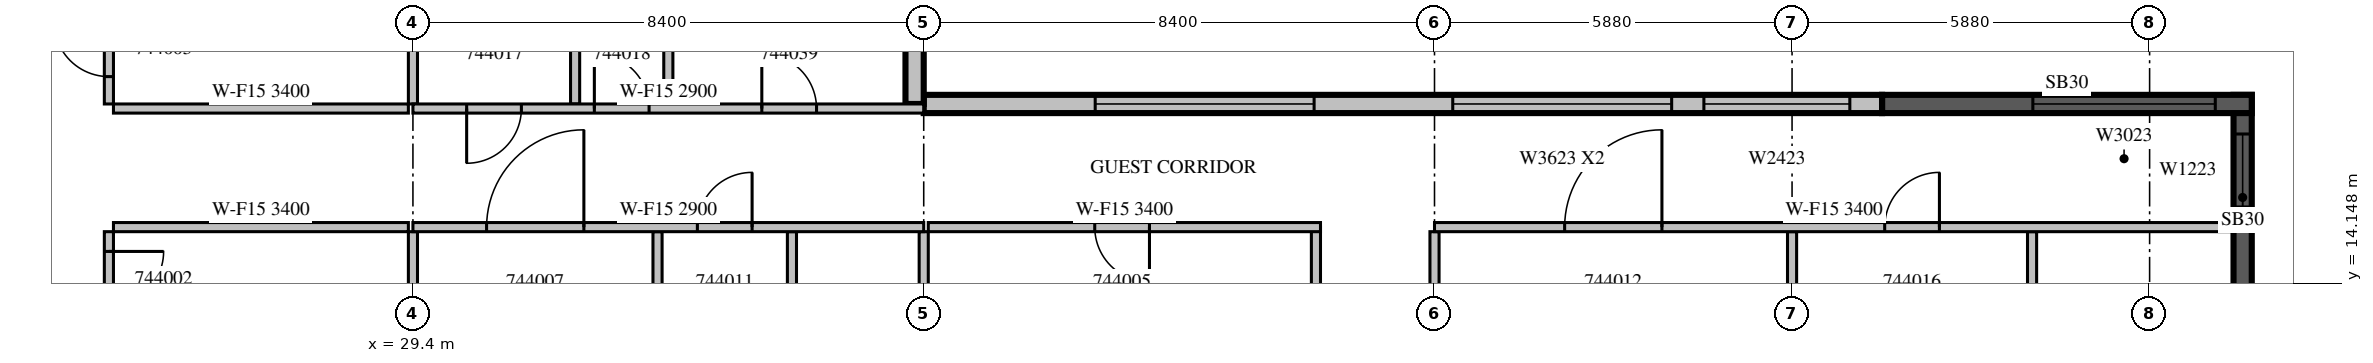
"""IFC4 building model, lengths in metres.
Left out: names, types, materials, properties, quantities, classifications, styles, units other than length and angle.
Written with IfcOpenShell. Run it as: python <this file> out.ifc"""

import sys

from ifc_helpers import new_model, si_unit, direction, frame, frame_2d, origin, place, context, subcontext, project, spatial, rectangle, extrude, source, transform, mapped, element, fill, save


model = new_model("IFC4")
c1 = context("Model", 3, precision=1e-05, world=origin(), true_north=direction((0.0, 1.0)))
c2 = subcontext(c1, "Body", "Model", "MODEL_VIEW")
j1 = project(units=[si_unit("LENGTHUNIT", "METRE"), si_unit("PLANEANGLEUNIT", "RADIAN")], contexts=[c1])
p1 = place(None, origin())
s1 = spatial("IfcSite", under=j1, at=p1, CompositionType="ELEMENT")
p2 = place(p1, origin())
s2 = spatial("IfcBuilding", under=s1, at=p2, CompositionType="ELEMENT")
p3 = place(p2, frame((0.0, 0.0, 200.6)))
s3 = spatial("IfcBuildingStorey", under=s2, at=p3, CompositionType="ELEMENT", Elevation=200.6)
m1 = source(origin(), c2, "Body", "SweptSolid", [
    extrude(rectangle(XDim=3.375, YDim=0.3, at=frame_2d((1.688, 0.0))), origin(), (0.0, 0.0, 1.0), 3.4),
])
p4 = place(p3, frame((59.49, 13.875, 0.0), z_axis=(0.0, 0.0, 1.0), x_axis=(0.0, 1.0, 0.0)))
e1 = element("IfcWall", 1, at=p4, inside=s3, PredefinedType="SOLIDWALL", context=c2, shape_type="MappedRepresentation", body=[
    mapped(m1, transform((0.0, 0.0, 0.0), scale=1.0)),
])
m2 = source(origin(), c2, "Body", "SweptSolid", [
    extrude(rectangle(XDim=1.2, YDim=2.3, at=frame_2d((0.6, 1.15))), frame((0.0, 0.16, 0.0), z_axis=(0.0, -1.0, 0.0), x_axis=(1.0, 0.0, 0.0)), (0.0, 0.0, 1.0), 0.32),
])
p5 = place(p4, frame((1.531, 0.0, 0.6)))
e2 = element("IfcOpeningElement", 2, at=p5, cuts=e1, PredefinedType="OPENING", context=c2, shape_type="MappedRepresentation", body=[
    mapped(m2, transform((0.0, 0.0, 0.0), scale=1.0)),
])
p6 = place(p3, frame((59.64, 17.1, 0.0), z_axis=(0.0, 0.0, 1.0), x_axis=(-1.0, 0.0, 0.0)))
e3 = element("IfcWall", 3, at=p6, inside=s3, PredefinedType="SOLIDWALL", context=c2, shape_type="SweptSolid", body=[
    extrude(rectangle(XDim=6.08, YDim=0.3, at=frame_2d((3.04, 0.0))), origin(), (0.0, 0.0, 1.0), 3.4),
])
m3 = source(origin(), c2, "Body", "SweptSolid", [
    extrude(rectangle(XDim=3.0, YDim=2.3, at=frame_2d((1.5, 1.15))), frame((0.0, 0.16, 0.0), z_axis=(0.0, -1.0, 0.0), x_axis=(1.0, 0.0, 0.0)), (0.0, 0.0, 1.0), 0.32),
])
p7 = place(p6, frame((0.6, 0.0, 0.6)))
e4 = element("IfcOpeningElement", 4, at=p7, cuts=e3, PredefinedType="OPENING", context=c2, shape_type="MappedRepresentation", body=[
    mapped(m3, transform((0.0, 0.0, 0.0), scale=1.0)),
])
p8 = place(p3, frame((53.56, 17.1, 0.0), z_axis=(0.0, 0.0, 1.0), x_axis=(-1.0, 0.0, 0.0)))
e5 = element("IfcWall", 5, at=p8, inside=s3, PredefinedType="STANDARD", context=c2, shape_type="SweptSolid", body=[
    extrude(rectangle(XDim=15.76, YDim=0.3, at=frame_2d((7.88, 0.0))), origin(), (0.0, 0.0, 1.0), 3.4),
])
m4 = source(origin(), c2, "Body", "SweptSolid", [
    extrude(rectangle(XDim=3.6, YDim=2.3, at=frame_2d((1.8, 1.15))), frame((0.0, 0.16, 0.0), z_axis=(0.0, -1.0, 0.0), x_axis=(1.0, 0.0, 0.0)), (0.0, 0.0, 1.0), 0.32),
])
p9 = place(p8, frame((3.46, 0.0, 0.6)))
e6 = element("IfcOpeningElement", 6, at=p9, cuts=e5, PredefinedType="OPENING", context=c2, shape_type="MappedRepresentation", body=[
    mapped(m4, transform((0.0, 0.0, 0.0), scale=1.0)),
])
p10 = place(p8, frame((9.34, 0.0, 0.6)))
e7 = element("IfcOpeningElement", 7, at=p10, cuts=e5, PredefinedType="OPENING", context=c2, shape_type="MappedRepresentation", body=[
    mapped(m4, transform((0.0, 0.0, 0.0), scale=1.0)),
])
m5 = source(origin(), c2, "Body", "SweptSolid", [
    extrude(rectangle(XDim=2.4, YDim=2.3, at=frame_2d((1.2, 1.15))), frame((0.0, 0.16, 0.0), z_axis=(0.0, -1.0, 0.0), x_axis=(1.0, 0.0, 0.0)), (0.0, 0.0, 1.0), 0.32),
])
p11 = place(p8, frame((0.53, 0.0, 0.6)))
e8 = element("IfcOpeningElement", 8, at=p11, cuts=e5, PredefinedType="OPENING", context=c2, shape_type="MappedRepresentation", body=[
    mapped(m5, transform((0.0, 0.0, 0.0), scale=1.0)),
])
m6 = source(origin(), c2, "Body", "SweptSolid", [
    extrude(rectangle(XDim=3.0, YDim=0.3, at=frame_2d((1.5, 0.0))), origin(), (0.0, 0.0, 1.0), 3.4),
])
p12 = place(p3, frame((37.65, 17.1, 0.0), z_axis=(0.0, 0.0, 1.0), x_axis=(0.0, 1.0, 0.0)))
e9 = element("IfcWall", 9, at=p12, inside=s3, PredefinedType="STANDARD", context=c2, shape_type="MappedRepresentation", body=[
    mapped(m6, transform((0.0, 0.0, 0.0), scale=1.0)),
])
p13 = place(p12, frame((1.425, 0.0, 0.6)))
e10 = element("IfcOpeningElement", 10, at=p13, cuts=e9, PredefinedType="OPENING", context=c2, shape_type="MappedRepresentation", body=[
    mapped(m2, transform((0.0, 0.0, 0.0), scale=1.0)),
])
m7 = source(origin(), c2, "Body", "SweptSolid", [
    extrude(rectangle(XDim=11.525, YDim=0.15, at=frame_2d((5.763, 0.0))), origin(), (0.0, 0.0, 1.0), 3.4),
])
p14 = place(p3, frame((24.4, 15.0, 0.0), z_axis=(0.0, 0.0, 1.0), x_axis=(0.0, -1.0, 0.0)))
e11 = element("IfcWall", 11, at=p14, inside=s3, PredefinedType="PARTITIONING", context=c2, shape_type="MappedRepresentation", body=[
    mapped(m7, transform((0.0, 0.0, 0.0), scale=1.0)),
])
m8 = source(origin(), c2, "Body", "SweptSolid", [
    extrude(rectangle(XDim=0.9, YDim=2.1, at=frame_2d((0.45, 1.05))), frame((0.0, 0.085, 0.0), z_axis=(0.0, -1.0, 0.0), x_axis=(1.0, 0.0, 0.0)), (0.0, 0.0, 1.0), 0.17),
])
p15 = place(p14, frame((6.963, 0.0, 0.0)))
e12 = element("IfcOpeningElement", 12, at=p15, cuts=e11, PredefinedType="OPENING", context=c2, shape_type="MappedRepresentation", body=[
    mapped(m8, transform((0.0, 0.0, 0.0), scale=1.0)),
])
p16 = place(p14, frame((0.325, 0.0, 0.0)))
e13 = element("IfcOpeningElement", 13, at=p16, cuts=e11, PredefinedType="OPENING", context=c2, shape_type="MappedRepresentation", body=[
    mapped(m8, transform((0.0, 0.0, 0.0), scale=1.0)),
])
m9 = source(origin(), c2, "Body", "SweptSolid", [
    extrude(rectangle(XDim=3.6, YDim=0.15, at=frame_2d((1.8, 0.0))), origin(), (0.0, 0.0, 1.0), 3.4),
])
p17 = place(p3, frame((24.4, 20.7, 0.0), z_axis=(0.0, 0.0, 1.0), x_axis=(0.0, -1.0, 0.0)))
e14 = element("IfcWall", 14, at=p17, inside=s3, PredefinedType="PARTITIONING", context=c2, shape_type="MappedRepresentation", body=[
    mapped(m9, transform((0.0, 0.0, 0.0), scale=1.0)),
])
p18 = place(p17, frame((2.25, 0.0, 0.0)))
e15 = element("IfcOpeningElement", 15, at=p18, cuts=e14, PredefinedType="OPENING", context=c2, shape_type="MappedRepresentation", body=[
    mapped(m8, transform((0.0, 0.0, 0.0), scale=1.0)),
])
m10 = source(origin(), c2, "Body", "SweptSolid", [
    extrude(rectangle(XDim=4.85, YDim=0.15, at=frame_2d((2.425, 0.0))), origin(), (0.0, 0.0, 1.0), 3.4),
])
for number, where, z_axis, x_axis in (
    (16, (29.325, 15.075, 0.0), (0.0, 0.0, 1.0), (-1.0, 0.0, 0.0)),
    (17, (24.475, 17.025, 0.0), (0.0, 0.0, 1.0), (1.0, 0.0, 0.0)),
):
    element("IfcWall", number, at=place(p3, frame(where, z_axis=z_axis, x_axis=x_axis)), inside=s3, PredefinedType="PARTITIONING", context=c2, shape_type="MappedRepresentation", body=[
        mapped(m10, transform((0.0, 0.0, 0.0), scale=1.0)),
    ])
m11 = source(origin(), c2, "Body", "SweptSolid", [
    extrude(rectangle(XDim=4.051, YDim=0.15, at=frame_2d((2.026, 0.0))), origin(), (0.0, 0.0, 1.0), 3.4),
])
p19 = place(p3, frame((29.4, 10.949, 0.0), z_axis=(0.0, 0.0, 1.0), x_axis=(0.0, 1.0, 0.0)))
e18 = element("IfcWall", 18, at=p19, inside=s3, PredefinedType="PARTITIONING", context=c2, shape_type="MappedRepresentation", body=[
    mapped(m11, transform((0.0, 0.0, 0.0), scale=1.0)),
])
m12 = source(origin(), c2, "Body", "SweptSolid", [
    extrude(rectangle(XDim=3.001, YDim=0.15, at=frame_2d((1.5, 0.0))), origin(), (0.0, 0.0, 1.0), 3.4),
])
p20 = place(p3, frame((29.4, 17.1, 0.0), z_axis=(0.0, 0.0, 1.0), x_axis=(0.0, 1.0, 0.0)))
e19 = element("IfcWall", 19, at=p20, inside=s3, PredefinedType="PARTITIONING", context=c2, shape_type="MappedRepresentation", body=[
    mapped(m12, transform((0.0, 0.0, 0.0), scale=1.0)),
])
p21 = place(p3, frame((44.25, 12.3, 0.0), z_axis=(0.0, 0.0, 1.0), x_axis=(0.0, 1.0, 0.0)))
e20 = element("IfcWall", 20, at=p21, inside=s3, PredefinedType="PARTITIONING", context=c2, shape_type="SweptSolid", body=[
    extrude(rectangle(XDim=2.775, YDim=0.15, at=frame_2d((1.387, 0.0))), origin(), (0.0, 0.0, 1.0), 3.4),
])
m13 = source(origin(), c2, "Body", "SweptSolid", [
    extrude(rectangle(XDim=6.45, YDim=0.15, at=frame_2d((3.225, 0.0))), origin(), (0.0, 0.0, 1.0), 3.4),
])
p22 = place(p3, frame((44.325, 15.075, 0.0), z_axis=(0.0, 0.0, 1.0), x_axis=(-1.0, 0.0, 0.0)))
e21 = element("IfcWall", 21, at=p22, inside=s3, PredefinedType="PARTITIONING", context=c2, shape_type="MappedRepresentation", body=[
    mapped(m13, transform((0.0, 0.0, 0.0), scale=1.0)),
])
p23 = place(p22, frame((2.812, 0.0, 0.0)))
e22 = element("IfcOpeningElement", 22, at=p23, cuts=e21, PredefinedType="OPENING", context=c2, shape_type="MappedRepresentation", body=[
    mapped(m8, transform((0.0, 0.0, 0.0), scale=1.0)),
])
m14 = source(origin(), c2, "Body", "SweptSolid", [
    extrude(rectangle(XDim=3.9, YDim=0.15, at=frame_2d((1.95, 0.0))), origin(), (0.0, 0.0, 1.0), 3.4),
])
for number, where, z_axis, x_axis in (
    (23, (33.422, 11.1, 0.0), (0.0, 0.0, 1.0), (0.0, 1.0, 0.0)),
    (24, (35.633, 11.1, 0.0), (0.0, 0.0, 1.0), (0.0, 1.0, 0.0)),
    (25, (37.8, 11.1, 0.0), (0.0, 0.0, 1.0), (0.0, 1.0, 0.0)),
    (26, (52.08, 11.1, 0.0), (0.0, 0.0, 1.0), (0.0, 1.0, 0.0)),
    (27, (56.027, 11.1, 0.0), (0.0, 0.0, 1.0), (0.0, 1.0, 0.0)),
    (28, (46.2, 11.1, 0.0), (0.0, 0.0, 1.0), (0.0, 1.0, 0.0)),
):
    element("IfcWall", number, at=place(p3, frame(where, z_axis=z_axis, x_axis=x_axis)), inside=s3, PredefinedType="PARTITIONING", context=c2, shape_type="MappedRepresentation", body=[
        mapped(m14, transform((0.0, 0.0, 0.0), scale=1.0)),
    ])
m15 = source(origin(), c2, "Body", "SweptSolid", [
    extrude(rectangle(XDim=3.6, YDim=0.15, at=frame_2d((1.8, 0.0))), origin(), (0.0, 0.0, 1.0), 2.4),
])
for number, where, z_axis, x_axis in (
    (29, (32.067, 20.7, 0.0), (0.0, 0.0, 1.0), (0.0, -1.0, 0.0)),
    (30, (33.6, 17.1, 0.0), (0.0, 0.0, 1.0), (0.0, 1.0, 0.0)),
):
    element("IfcWall", number, at=place(p3, frame(where, z_axis=z_axis, x_axis=x_axis)), inside=s3, PredefinedType="PARTITIONING", context=c2, shape_type="MappedRepresentation", body=[
        mapped(m15, transform((0.0, 0.0, 0.0), scale=1.0)),
    ])
m16 = source(origin(), c2, "Body", "SweptSolid", [
    extrude(rectangle(XDim=8.4, YDim=0.15, at=frame_2d((4.2, 0.0))), origin(), (0.0, 0.0, 1.0), 2.9),
])
p24 = place(p3, frame((37.8, 15.075, 0.0), z_axis=(0.0, 0.0, 1.0), x_axis=(-1.0, 0.0, 0.0)))
e31 = element("IfcWall", 31, at=p24, inside=s3, PredefinedType="PARTITIONING", context=c2, shape_type="MappedRepresentation", body=[
    mapped(m16, transform((0.0, 0.0, 0.0), scale=1.0)),
])
m17 = source(origin(), c2, "Body", "SweptSolid", [
    extrude(rectangle(XDim=1.6, YDim=2.1, at=frame_2d((0.8, 1.05))), frame((0.0, 0.085, 0.0), z_axis=(0.0, -1.0, 0.0), x_axis=(1.0, 0.0, 0.0)), (0.0, 0.0, 1.0), 0.17),
])
p25 = place(p24, frame((5.589, 0.0, 0.0)))
e32 = element("IfcOpeningElement", 32, at=p25, cuts=e31, PredefinedType="OPENING", context=c2, shape_type="MappedRepresentation", body=[
    mapped(m17, transform((0.0, 0.0, 0.0), scale=1.0)),
])
p26 = place(p24, frame((2.822, 0.0, 0.0)))
e33 = element("IfcOpeningElement", 33, at=p26, cuts=e31, PredefinedType="OPENING", context=c2, shape_type="MappedRepresentation", body=[
    mapped(m8, transform((0.0, 0.0, 0.0), scale=1.0)),
])
m18 = source(origin(), c2, "Body", "SweptSolid", [
    extrude(rectangle(XDim=13.14, YDim=0.15, at=frame_2d((6.57, 0.0))), origin(), (0.0, 0.0, 1.0), 3.4),
])
p27 = place(p3, frame((59.34, 15.075, 0.0), z_axis=(0.0, 0.0, 1.0), x_axis=(-1.0, 0.0, 0.0)))
e34 = element("IfcWall", 34, at=p27, inside=s3, PredefinedType="PARTITIONING", context=c2, shape_type="MappedRepresentation", body=[
    mapped(m18, transform((0.0, 0.0, 0.0), scale=1.0)),
])
p28 = place(p27, frame((9.4, 0.0, 0.0)))
e35 = element("IfcOpeningElement", 35, at=p28, cuts=e34, PredefinedType="OPENING", context=c2, shape_type="MappedRepresentation", body=[
    mapped(m17, transform((0.0, 0.0, 0.0), scale=1.0)),
])
p29 = place(p27, frame((4.837, 0.0, 0.0)))
e36 = element("IfcOpeningElement", 36, at=p29, cuts=e34, PredefinedType="OPENING", context=c2, shape_type="MappedRepresentation", body=[
    mapped(m8, transform((0.0, 0.0, 0.0), scale=1.0)),
])
p30 = place(p3, frame((29.4, 17.025, 0.0), z_axis=(0.0, 0.0, 1.0), x_axis=(1.0, 0.0, 0.0)))
e37 = element("IfcWall", 37, at=p30, inside=s3, PredefinedType="PARTITIONING", context=c2, shape_type="MappedRepresentation", body=[
    mapped(m16, transform((0.0, 0.0, 0.0), scale=1.0)),
])
p31 = place(p30, frame((0.883, 0.0, 0.0)))
e38 = element("IfcOpeningElement", 38, at=p31, cuts=e37, PredefinedType="OPENING", context=c2, shape_type="MappedRepresentation", body=[
    mapped(m8, transform((0.0, 0.0, 0.0), scale=1.0)),
])
p32 = place(p30, frame((2.983, 0.0, 0.0)))
e39 = element("IfcOpeningElement", 39, at=p32, cuts=e37, PredefinedType="OPENING", context=c2, shape_type="MappedRepresentation", body=[
    mapped(m8, transform((0.0, 0.0, 0.0), scale=1.0)),
])
p33 = place(p30, frame((5.737, 0.0, 0.0)))
e40 = element("IfcOpeningElement", 40, at=p33, cuts=e37, PredefinedType="OPENING", context=c2, shape_type="MappedRepresentation", body=[
    mapped(m8, transform((0.0, 0.0, 0.0), scale=1.0)),
])
m19 = source(origin(), c2, "Body", "SweptSolid", [
    extrude(rectangle(XDim=1.2, YDim=2.3, at=frame_2d((0.6, 1.15))), frame((0.0, 0.03, 0.0), z_axis=(0.0, -1.0, 0.0), x_axis=(1.0, 0.0, 0.0)), (0.0, 0.0, 1.0), 0.06),
])
p34 = place(p5, origin())
e41 = element("IfcWindow", 41, at=p34, inside=s3, PartitioningType="SINGLE_PANEL", PredefinedType="WINDOW", context=c2, shape_type="MappedRepresentation", body=[
    mapped(m19, transform((0.0, 0.0, 0.0), scale=1.0)),
])
fill(e2, e41)
m20 = source(origin(), c2, "Body", "SweptSolid", [
    extrude(rectangle(XDim=3.0, YDim=2.3, at=frame_2d((1.5, 1.15))), frame((0.0, 0.03, 0.0), z_axis=(0.0, -1.0, 0.0), x_axis=(1.0, 0.0, 0.0)), (0.0, 0.0, 1.0), 0.06),
])
p35 = place(p7, origin())
e42 = element("IfcWindow", 42, at=p35, inside=s3, PartitioningType="SINGLE_PANEL", PredefinedType="WINDOW", context=c2, shape_type="MappedRepresentation", body=[
    mapped(m20, transform((0.0, 0.0, 0.0), scale=1.0)),
])
fill(e4, e42)
m21 = source(origin(), c2, "Body", "SweptSolid", [
    extrude(rectangle(XDim=3.6, YDim=2.3, at=frame_2d((1.8, 1.15))), frame((0.0, 0.03, 0.0), z_axis=(0.0, -1.0, 0.0), x_axis=(1.0, 0.0, 0.0)), (0.0, 0.0, 1.0), 0.06),
])
p36 = place(p9, origin())
e43 = element("IfcWindow", 43, at=p36, inside=s3, PartitioningType="SINGLE_PANEL", PredefinedType="WINDOW", context=c2, shape_type="MappedRepresentation", body=[
    mapped(m21, transform((0.0, 0.0, 0.0), scale=1.0)),
])
fill(e6, e43)
p37 = place(p10, origin())
e44 = element("IfcWindow", 44, at=p37, inside=s3, PartitioningType="SINGLE_PANEL", PredefinedType="WINDOW", context=c2, shape_type="MappedRepresentation", body=[
    mapped(m21, transform((0.0, 0.0, 0.0), scale=1.0)),
])
fill(e7, e44)
m22 = source(origin(), c2, "Body", "SweptSolid", [
    extrude(rectangle(XDim=2.4, YDim=2.3, at=frame_2d((1.2, 1.15))), frame((0.0, 0.03, 0.0), z_axis=(0.0, -1.0, 0.0), x_axis=(1.0, 0.0, 0.0)), (0.0, 0.0, 1.0), 0.06),
])
p38 = place(p11, origin())
e45 = element("IfcWindow", 45, at=p38, inside=s3, PartitioningType="SINGLE_PANEL", PredefinedType="WINDOW", context=c2, shape_type="MappedRepresentation", body=[
    mapped(m22, transform((0.0, 0.0, 0.0), scale=1.0)),
])
fill(e8, e45)
m23 = source(origin(), c2, "Body", "SweptSolid", [
    extrude(rectangle(XDim=0.9, YDim=2.1, at=frame_2d((0.45, 1.05))), frame((0.0, 0.025, 0.0), z_axis=(0.0, -1.0, 0.0), x_axis=(1.0, 0.0, 0.0)), (0.0, 0.0, 1.0), 0.05),
])
p39 = place(p16, origin())
e46 = element("IfcDoor", 46, at=p39, inside=s3, OperationType="SINGLE_SWING_LEFT", PredefinedType="DOOR", context=c2, shape_type="MappedRepresentation", body=[
    mapped(m23, transform((0.0, 0.0, 0.0), scale=1.0)),
])
fill(e13, e46)
p40 = place(p18, origin())
e47 = element("IfcDoor", 47, at=p40, inside=s3, OperationType="SINGLE_SWING_RIGHT", PredefinedType="DOOR", context=c2, shape_type="MappedRepresentation", body=[
    mapped(m23, transform((0.0, 0.0, 0.0), scale=1.0)),
])
fill(e15, e47)
p41 = place(p23, origin())
e48 = element("IfcDoor", 48, at=p41, inside=s3, OperationType="SINGLE_SWING_LEFT", PredefinedType="DOOR", context=c2, shape_type="MappedRepresentation", body=[
    mapped(m23, transform((0.0, 0.0, 0.0), scale=1.0)),
])
fill(e22, e48)
m24 = source(origin(), c2, "Body", "SweptSolid", [
    extrude(rectangle(XDim=1.6, YDim=2.1, at=frame_2d((0.8, 1.05))), frame((0.0, 0.025, 0.0), z_axis=(0.0, -1.0, 0.0), x_axis=(1.0, 0.0, 0.0)), (0.0, 0.0, 1.0), 0.05),
])
p42 = place(p25, origin())
e49 = element("IfcDoor", 49, at=p42, inside=s3, OperationType="SINGLE_SWING_RIGHT", PredefinedType="DOOR", context=c2, shape_type="MappedRepresentation", body=[
    mapped(m24, transform((0.0, 0.0, 0.0), scale=1.0)),
])
fill(e32, e49)
p43 = place(p26, origin())
e50 = element("IfcDoor", 50, at=p43, inside=s3, OperationType="SINGLE_SWING_RIGHT", PredefinedType="DOOR", context=c2, shape_type="MappedRepresentation", body=[
    mapped(m23, transform((0.0, 0.0, 0.0), scale=1.0)),
])
fill(e33, e50)
p44 = place(p28, origin())
e51 = element("IfcDoor", 51, at=p44, inside=s3, OperationType="SINGLE_SWING_RIGHT", PredefinedType="DOOR", context=c2, shape_type="MappedRepresentation", body=[
    mapped(m24, transform((0.0, 0.0, 0.0), scale=1.0)),
])
fill(e35, e51)
p45 = place(p29, origin())
e52 = element("IfcDoor", 52, at=p45, inside=s3, OperationType="SINGLE_SWING_RIGHT", PredefinedType="DOOR", context=c2, shape_type="MappedRepresentation", body=[
    mapped(m23, transform((0.0, 0.0, 0.0), scale=1.0)),
])
fill(e36, e52)
p46 = place(p31, origin())
e53 = element("IfcDoor", 53, at=p46, inside=s3, OperationType="SINGLE_SWING_RIGHT", PredefinedType="DOOR", context=c2, shape_type="MappedRepresentation", body=[
    mapped(m23, transform((0.0, 0.0, 0.0), scale=1.0)),
])
fill(e38, e53)
p47 = place(p32, origin())
e54 = element("IfcDoor", 54, at=p47, inside=s3, OperationType="SINGLE_SWING_LEFT", PredefinedType="DOOR", context=c2, shape_type="MappedRepresentation", body=[
    mapped(m23, transform((0.0, 0.0, 0.0), scale=1.0)),
])
fill(e39, e54)
p48 = place(p33, origin())
e55 = element("IfcDoor", 55, at=p48, inside=s3, OperationType="SINGLE_SWING_LEFT", PredefinedType="DOOR", context=c2, shape_type="MappedRepresentation", body=[
    mapped(m23, transform((0.0, 0.0, 0.0), scale=1.0)),
])
fill(e40, e55)
save(model, sys.argv[1])
